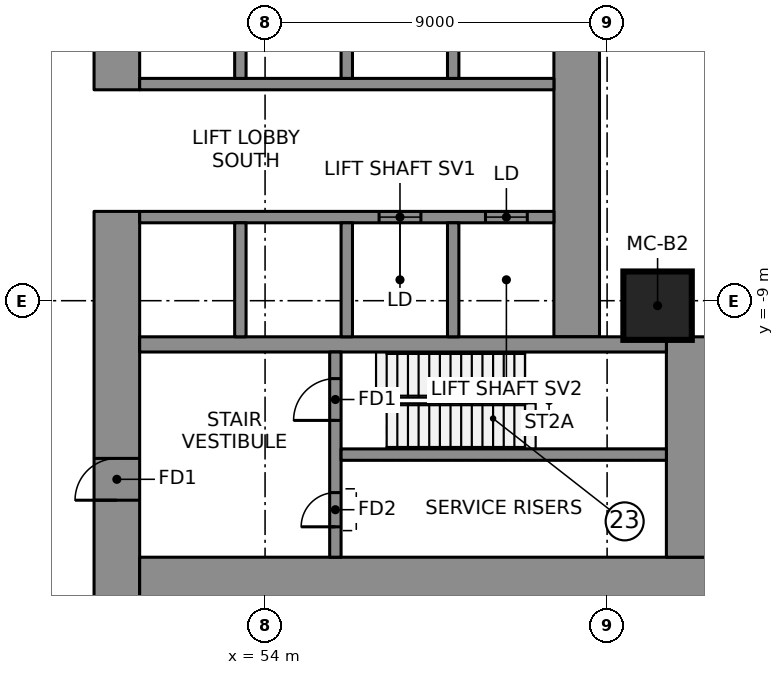
"""IFC4 building model, lengths in metres.
Left out: names, types, materials, properties, quantities, classifications, styles, units other than length and angle.
Written with IfcOpenShell. Run it as: python <this file> out.ifc"""

import sys

from ifc_helpers import new_model, si_unit, direction, frame, frame_2d, origin, origin_2d, place, context, subcontext, project, spatial, rectangle, extrude, element, fill, save


model = new_model("IFC4")
c1 = context("Model", 3, precision=1e-05, world=origin(), true_north=direction((0.0, 1.0)))
c2 = subcontext(c1, "Body", "Model", "MODEL_VIEW")
j1 = project(units=[si_unit("LENGTHUNIT", "METRE"), si_unit("PLANEANGLEUNIT", "RADIAN")], contexts=[c1])
p1 = place(None, origin())
s1 = spatial("IfcSite", under=j1, at=p1, CompositionType="ELEMENT")
p2 = place(p1, origin())
s2 = spatial("IfcBuilding", under=s1, at=p2, CompositionType="ELEMENT")
p3 = place(p2, frame((0.0, 0.0, -5.0)))
s3 = spatial("IfcBuildingStorey", under=s2, at=p3, CompositionType="ELEMENT", Elevation=-5.0)
p4 = place(p3, frame((50.1, -3.45, 0.0), z_axis=(0.0, 0.0, 1.0), x_axis=(0.0, 1.0, 0.0)))
e1 = element("IfcWall", 1, at=p4, inside=s3, PredefinedType="SHEAR", context=c2, shape_type="SweptSolid", body=[
    extrude(rectangle(XDim=6.9, YDim=1.2, at=frame_2d((3.45, 0.0))), origin(), (0.0, 0.0, 1.0), 5.0),
])
p5 = place(p3, frame((50.1, -16.95, 0.0), z_axis=(0.0, 0.0, 1.0), x_axis=(0.0, 1.0, 0.0)))
e2 = element("IfcWall", 2, at=p5, inside=s3, PredefinedType="SHEAR", context=c2, shape_type="SweptSolid", body=[
    extrude(rectangle(XDim=10.3, YDim=1.2, at=frame_2d((5.15, 0.0))), origin(), (0.0, 0.0, 1.0), 5.0),
])
p6 = place(p5, frame((2.7, 0.0, 0.0)))
e3 = element("IfcOpeningElement", 3, at=p6, cuts=e2, PredefinedType="OPENING", context=c2, shape_type="SweptSolid", body=[
    extrude(rectangle(XDim=1.1, YDim=2.1, at=frame_2d((0.55, 1.05))), frame((0.0, 0.61, 0.0), z_axis=(0.0, -1.0, 0.0), x_axis=(1.0, 0.0, 0.0)), (0.0, 0.0, 1.0), 1.22),
])
p7 = place(p3, frame((50.7, -16.35, 0.0), z_axis=(0.0, 0.0, 1.0), x_axis=(1.0, 0.0, 0.0)))
e4 = element("IfcWall", 4, at=p7, inside=s3, PredefinedType="SHEAR", context=c2, shape_type="SweptSolid", body=[
    extrude(rectangle(XDim=15.06, YDim=1.2, at=frame_2d((7.53, 0.0))), origin(), (0.0, 0.0, 1.0), 5.0),
])
p8 = place(p3, frame((65.16, -15.75, 0.0), z_axis=(0.0, 0.0, 1.0), x_axis=(0.0, 1.0, 0.0)))
e5 = element("IfcWall", 5, at=p8, inside=s3, PredefinedType="SHEAR", context=c2, shape_type="SweptSolid", body=[
    extrude(rectangle(XDim=5.8, YDim=1.2, at=frame_2d((2.9, 0.0))), origin(), (0.0, 0.0, 1.0), 5.0),
])
p9 = place(p3, frame((62.2, -9.95, 0.0), z_axis=(0.0, 0.0, 1.0), x_axis=(0.0, 1.0, 0.0)))
e6 = element("IfcWall", 6, at=p9, inside=s3, PredefinedType="SHEAR", context=c2, shape_type="SweptSolid", body=[
    extrude(rectangle(XDim=19.9, YDim=1.2, at=frame_2d((9.95, 0.0))), origin(), (0.0, 0.0, 1.0), 5.0),
])
p10 = place(p3, frame((50.7, -10.15, 0.0), z_axis=(0.0, 0.0, 1.0), x_axis=(1.0, 0.0, 0.0)))
e7 = element("IfcWall", 7, at=p10, inside=s3, PredefinedType="SHEAR", context=c2, shape_type="SweptSolid", body=[
    extrude(rectangle(XDim=13.86, YDim=0.4, at=frame_2d((6.93, 0.0))), origin(), (0.0, 0.0, 1.0), 5.0),
])
p11 = place(p3, frame((50.7, -3.3, 0.0), z_axis=(0.0, 0.0, 1.0), x_axis=(1.0, 0.0, 0.0)))
e8 = element("IfcWall", 8, at=p11, inside=s3, PredefinedType="SHEAR", context=c2, shape_type="SweptSolid", body=[
    extrude(rectangle(XDim=10.9, YDim=0.3, at=frame_2d((5.45, 0.0))), origin(), (0.0, 0.0, 1.0), 5.0),
])
p12 = place(p3, frame((50.7, -6.8, 0.0), z_axis=(0.0, 0.0, 1.0), x_axis=(1.0, 0.0, 0.0)))
e9 = element("IfcWall", 9, at=p12, inside=s3, PredefinedType="SHEAR", context=c2, shape_type="SweptSolid", body=[
    extrude(rectangle(XDim=10.9, YDim=0.3, at=frame_2d((5.45, 0.0))), origin(), (0.0, 0.0, 1.0), 5.0),
])
p13 = place(p12, frame((6.3, 0.0, 0.0)))
e10 = element("IfcOpeningElement", 10, at=p13, cuts=e9, PredefinedType="OPENING", context=c2, shape_type="SweptSolid", body=[
    extrude(rectangle(XDim=1.1, YDim=2.1, at=frame_2d((0.55, 1.05))), frame((0.0, 0.16, 0.0), z_axis=(0.0, -1.0, 0.0), x_axis=(1.0, 0.0, 0.0)), (0.0, 0.0, 1.0), 0.32),
])
p14 = place(p12, frame((9.1, 0.0, 0.0)))
e11 = element("IfcOpeningElement", 11, at=p14, cuts=e9, PredefinedType="OPENING", context=c2, shape_type="SweptSolid", body=[
    extrude(rectangle(XDim=1.1, YDim=2.1, at=frame_2d((0.55, 1.05))), frame((0.0, 0.16, 0.0), z_axis=(0.0, -1.0, 0.0), x_axis=(1.0, 0.0, 0.0)), (0.0, 0.0, 1.0), 0.32),
])
for number, where, z_axis, x_axis in (
    (12, (53.35, -3.15, 0.0), (0.0, 0.0, 1.0), (0.0, 1.0, 0.0)),
    (13, (53.35, -9.95, 0.0), (0.0, 0.0, 1.0), (0.0, 1.0, 0.0)),
    (14, (56.15, -3.15, 0.0), (0.0, 0.0, 1.0), (0.0, 1.0, 0.0)),
    (15, (56.15, -9.95, 0.0), (0.0, 0.0, 1.0), (0.0, 1.0, 0.0)),
    (16, (58.95, -3.15, 0.0), (0.0, 0.0, 1.0), (0.0, 1.0, 0.0)),
    (17, (58.95, -9.95, 0.0), (0.0, 0.0, 1.0), (0.0, 1.0, 0.0)),
):
    element("IfcWall", number, at=place(p3, frame(where, z_axis=z_axis, x_axis=x_axis)), inside=s3, PredefinedType="SHEAR", context=c2, shape_type="SweptSolid", body=[
        extrude(rectangle(XDim=3.0, YDim=0.3, at=frame_2d((1.5, 0.0))), origin(), (0.0, 0.0, 1.0), 5.0),
    ])
p15 = place(p3, frame((55.85, -15.75, 0.0), z_axis=(0.0, 0.0, 1.0), x_axis=(0.0, 1.0, 0.0)))
e18 = element("IfcWall", 18, at=p15, inside=s3, PredefinedType="SHEAR", context=c2, shape_type="SweptSolid", body=[
    extrude(rectangle(XDim=5.4, YDim=0.3, at=frame_2d((2.7, 0.0))), origin(), (0.0, 0.0, 1.0), 5.0),
])
p16 = place(p15, frame((3.6, 0.0, 0.0)))
e19 = element("IfcOpeningElement", 19, at=p16, cuts=e18, PredefinedType="OPENING", context=c2, shape_type="SweptSolid", body=[
    extrude(rectangle(XDim=1.1, YDim=2.1, at=frame_2d((0.55, 1.05))), frame((0.0, 0.16, 0.0), z_axis=(0.0, -1.0, 0.0), x_axis=(1.0, 0.0, 0.0)), (0.0, 0.0, 1.0), 0.32),
])
p17 = place(p15, frame((0.8, 0.0, 0.0)))
e20 = element("IfcOpeningElement", 20, at=p17, cuts=e18, PredefinedType="OPENING", context=c2, shape_type="SweptSolid", body=[
    extrude(rectangle(XDim=0.9, YDim=2.1, at=frame_2d((0.45, 1.05))), frame((0.0, 0.16, 0.0), z_axis=(0.0, -1.0, 0.0), x_axis=(1.0, 0.0, 0.0)), (0.0, 0.0, 1.0), 0.32),
])
p18 = place(p3, frame((56.0, -13.05, 0.0), z_axis=(0.0, 0.0, 1.0), x_axis=(1.0, 0.0, 0.0)))
e21 = element("IfcWall", 21, at=p18, inside=s3, PredefinedType="SHEAR", context=c2, shape_type="SweptSolid", body=[
    extrude(rectangle(XDim=8.56, YDim=0.3, at=frame_2d((4.28, 0.0))), origin(), (0.0, 0.0, 1.0), 5.0),
])
p19 = place(p3, frame((64.328, -9.131, 0.0), z_axis=(0.0, 0.0, 1.0), x_axis=(1.0, 0.0, 0.0)))
e22 = element("IfcColumn", 22, at=p19, inside=s3, PredefinedType="COLUMN", context=c2, shape_type="SweptSolid", body=[
    extrude(rectangle(XDim=1.8, YDim=1.8, at=origin_2d()), origin(), (0.0, 0.0, 1.0), 5.0),
])
p20 = place(p13, origin())
e23 = element("IfcDoor", 23, at=p20, inside=s3, OperationType="DOUBLE_DOOR_SLIDING", PredefinedType="DOOR", context=c2, shape_type="SweptSolid", body=[
    extrude(rectangle(XDim=1.1, YDim=2.1, at=frame_2d((0.55, 1.05))), frame((0.0, 0.025, 0.0), z_axis=(0.0, -1.0, 0.0), x_axis=(1.0, 0.0, 0.0)), (0.0, 0.0, 1.0), 0.05),
])
fill(e10, e23)
p21 = place(p14, origin())
e24 = element("IfcDoor", 24, at=p21, inside=s3, OperationType="DOUBLE_DOOR_SLIDING", PredefinedType="DOOR", context=c2, shape_type="SweptSolid", body=[
    extrude(rectangle(XDim=1.1, YDim=2.1, at=frame_2d((0.55, 1.05))), frame((0.0, 0.025, 0.0), z_axis=(0.0, -1.0, 0.0), x_axis=(1.0, 0.0, 0.0)), (0.0, 0.0, 1.0), 0.05),
])
fill(e11, e24)
p22 = place(p16, origin())
e25 = element("IfcDoor", 25, at=p22, inside=s3, OperationType="SINGLE_SWING_RIGHT", PredefinedType="DOOR", context=c2, shape_type="SweptSolid", body=[
    extrude(rectangle(XDim=1.1, YDim=2.1, at=frame_2d((0.55, 1.05))), frame((0.0, 0.025, 0.0), z_axis=(0.0, -1.0, 0.0), x_axis=(1.0, 0.0, 0.0)), (0.0, 0.0, 1.0), 0.05),
])
fill(e19, e25)
p23 = place(p6, origin())
e26 = element("IfcDoor", 26, at=p23, inside=s3, OperationType="SINGLE_SWING_RIGHT", PredefinedType="DOOR", context=c2, shape_type="SweptSolid", body=[
    extrude(rectangle(XDim=1.1, YDim=2.1, at=frame_2d((0.55, 1.05))), frame((0.0, 0.025, 0.0), z_axis=(0.0, -1.0, 0.0), x_axis=(1.0, 0.0, 0.0)), (0.0, 0.0, 1.0), 0.05),
])
fill(e3, e26)
p24 = place(p17, origin())
e27 = element("IfcDoor", 27, at=p24, inside=s3, OperationType="SINGLE_SWING_LEFT", PredefinedType="DOOR", context=c2, shape_type="SweptSolid", body=[
    extrude(rectangle(XDim=0.9, YDim=2.1, at=frame_2d((0.45, 1.05))), frame((0.0, 0.025, 0.0), z_axis=(0.0, -1.0, 0.0), x_axis=(1.0, 0.0, 0.0)), (0.0, 0.0, 1.0), 0.05),
])
fill(e20, e27)
save(model, sys.argv[1])
